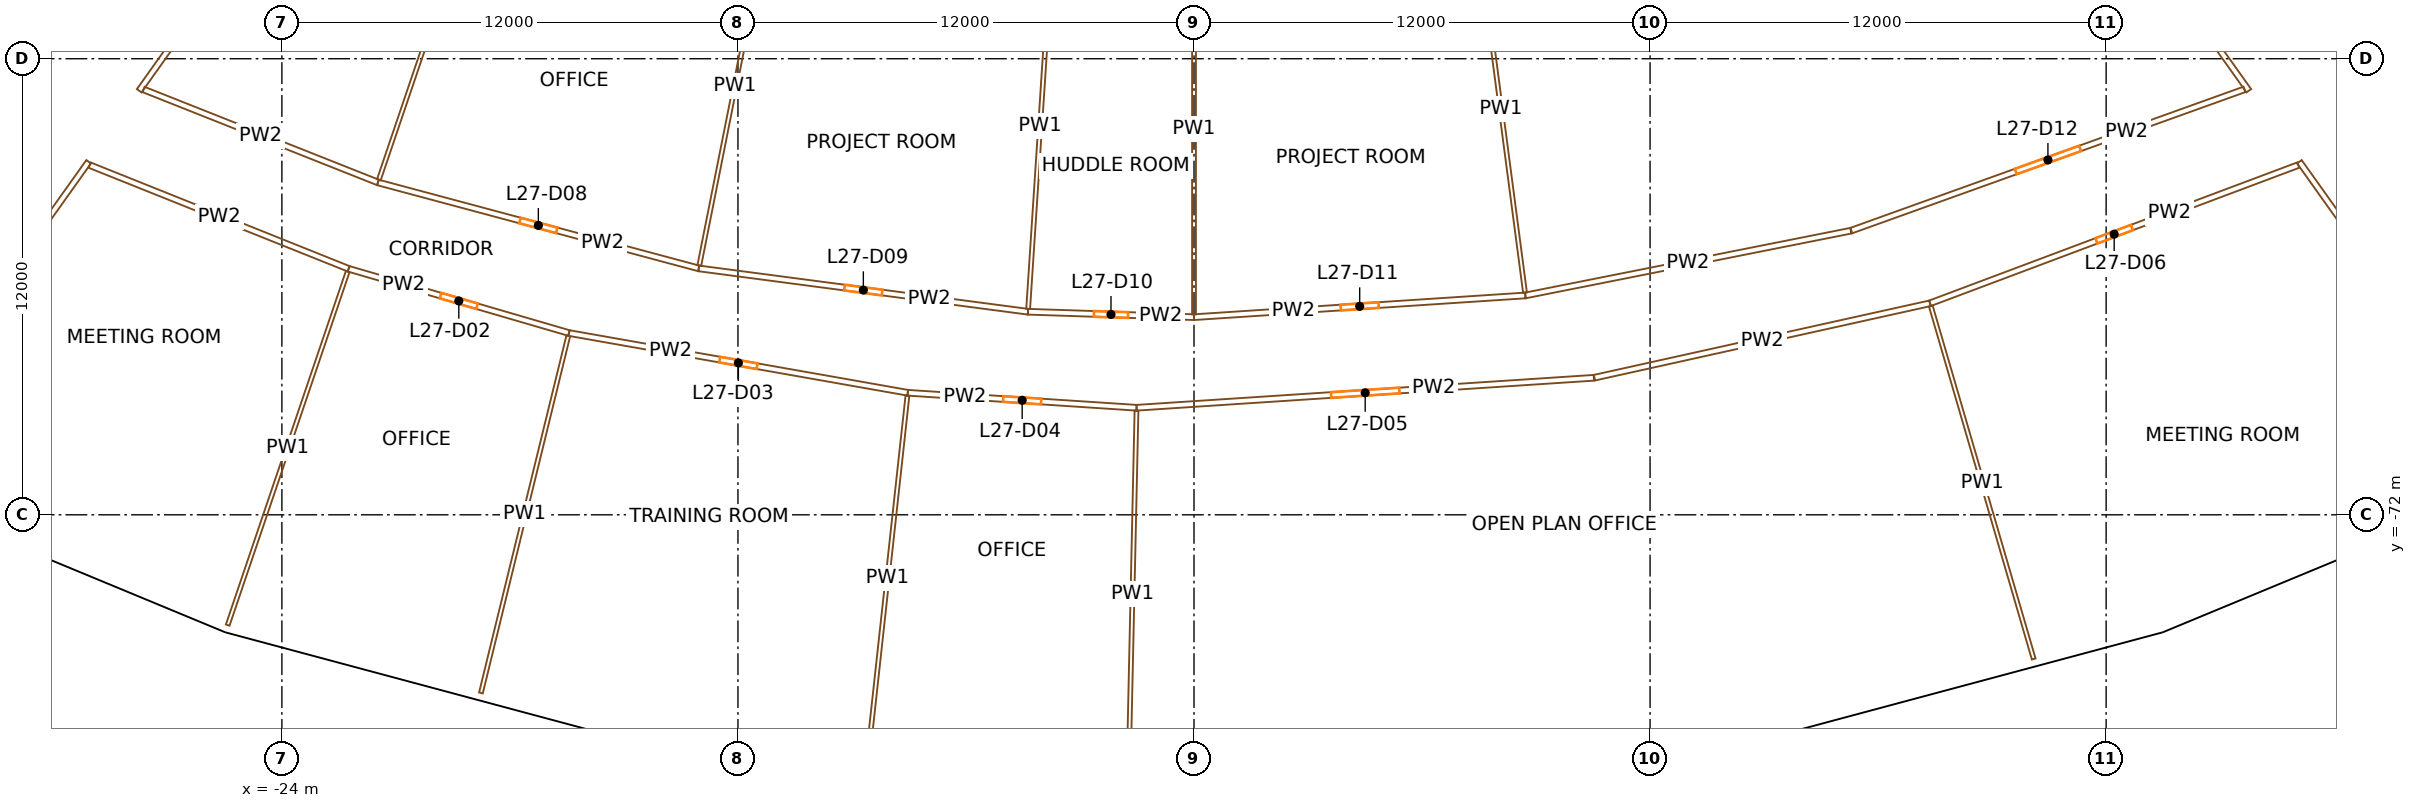
"""IFC4 building model, lengths in metres.
Left out: names, types, materials, properties, quantities, classifications, styles, units other than length and angle.
Written with IfcOpenShell. Run it as: python <this file> out.ifc"""

import sys

from ifc_helpers import new_model, si_unit, direction, frame, frame_2d, origin, origin_2d, place, context, subcontext, project, spatial, rectangle, extrude, element, fill, save


model = new_model("IFC4")
c1 = context("Model", 3, precision=1e-05, world=origin(), true_north=direction((0.0, 1.0)))
c2 = subcontext(c1, "Body", "Model", "MODEL_VIEW")
j1 = project(units=[si_unit("LENGTHUNIT", "METRE"), si_unit("PLANEANGLEUNIT", "RADIAN")], contexts=[c1])
p1 = place(None, origin())
s1 = spatial("IfcSite", under=j1, at=p1, CompositionType="ELEMENT")
p2 = place(p1, origin())
s2 = spatial("IfcBuilding", under=s1, at=p2, CompositionType="ELEMENT")
p3 = place(p2, frame((0.0, 0.0, 121.5)))
s3 = spatial("IfcBuildingStorey", under=s2, at=p3, CompositionType="ELEMENT", Elevation=121.5)
for number, where, z_axis, x_axis in (
    (1, (-24.992, -73.624, 0.0), (0.0, 0.0, 1.0), (0.947, -0.321, 0.0)),
    (2, (-15.168, -76.256, 0.0), (0.0, 0.0, 1.0), (0.981, -0.195, 0.0)),
    (3, (-5.085, -77.583, 0.0), (0.0, 0.0, 1.0), (0.998, -0.065, 0.0)),
    (4, (5.085, -77.583, 0.0), (0.0, 0.0, 1.0), (0.998, 0.065, 0.0)),
    (5, (15.168, -76.256, 0.0), (0.0, 0.0, 1.0), (0.981, 0.195, 0.0)),
    (6, (24.992, -73.624, 0.0), (0.0, 0.0, 1.0), (0.947, 0.321, 0.0)),
):
    element("IfcColumn", number, at=place(p3, frame(where, z_axis=z_axis, x_axis=x_axis)), inside=s3, PredefinedType="COLUMN", context=c2, shape_type="SweptSolid", body=[
        extrude(rectangle(XDim=1.2, YDim=1.5, at=origin_2d()), origin(), (0.0, 0.0, 1.0), 3.8),
    ])
p4 = place(p3, frame((-36.717, -66.337, 0.0), z_axis=(0.0, 0.0, 1.0), x_axis=(0.573577477574, 0.819151315216, 0.0)))
e7 = element("IfcWall", 7, at=p4, inside=s3, PredefinedType="SHEAR", context=c2, shape_type="SweptSolid", body=[
    extrude(rectangle(XDim=14.8, YDim=0.9, at=frame_2d((7.4, 0.0))), origin(), (0.0, 0.0, 1.0), 3.5),
])
p5 = place(p4, frame((6.2, 0.0, 0.0)))
e8 = element("IfcOpeningElement", 8, at=p5, cuts=e7, PredefinedType="OPENING", context=c2, shape_type="SweptSolid", body=[
    extrude(rectangle(XDim=2.4, YDim=2.1, at=frame_2d((1.2, 1.05))), frame((0.0, 0.46, 0.0), z_axis=(0.0, -1.0, 0.0), x_axis=(1.0, 0.0, 0.0)), (0.0, 0.0, 1.0), 0.92),
])
p6 = place(p3, frame((36.717, -66.337, 0.0), z_axis=(0.0, 0.0, 1.0), x_axis=(-0.573577477574, 0.819151315216, 0.0)))
e9 = element("IfcWall", 9, at=p6, inside=s3, PredefinedType="SHEAR", context=c2, shape_type="SweptSolid", body=[
    extrude(rectangle(XDim=14.8, YDim=0.9, at=frame_2d((7.4, 0.0))), origin(), (0.0, 0.0, 1.0), 3.5),
])
p7 = place(p6, frame((6.2, 0.0, 0.0)))
e10 = element("IfcOpeningElement", 10, at=p7, cuts=e9, PredefinedType="OPENING", context=c2, shape_type="SweptSolid", body=[
    extrude(rectangle(XDim=2.4, YDim=2.1, at=frame_2d((1.2, 1.05))), frame((0.0, 0.46, 0.0), z_axis=(0.0, -1.0, 0.0), x_axis=(1.0, 0.0, 0.0)), (0.0, 0.0, 1.0), 0.92),
])
p8 = place(p3, frame((-29.084, -62.71, 0.0), z_axis=(0.0, 0.0, 1.0), x_axis=(-0.580031092611, -0.814594335608, 0.0)))
e11 = element("IfcWall", 11, at=p8, inside=s3, PredefinedType="PARTITIONING", context=c2, shape_type="SweptSolid", body=[
    extrude(rectangle(XDim=10.126, YDim=0.15, at=frame_2d((5.063, 0.0))), origin(), (0.0, 0.0, 1.0), 2.4),
])
p9 = place(p8, frame((4.563, 0.0, 0.0)))
e12 = element("IfcOpeningElement", 12, at=p9, cuts=e11, PredefinedType="OPENING", context=c2, shape_type="SweptSolid", body=[
    extrude(rectangle(XDim=1.0, YDim=2.1, at=frame_2d((0.5, 1.05))), frame((0.0, 0.085, 0.0), z_axis=(0.0, -1.0, 0.0), x_axis=(1.0, 0.0, 0.0)), (0.0, 0.0, 1.0), 0.17),
])
p10 = place(p3, frame((-29.058, -62.799, 0.0), z_axis=(0.0, 0.0, 1.0), x_axis=(0.92834358791, -0.371723261025, 0.0)))
e13 = element("IfcWall", 13, at=p10, inside=s3, PredefinedType="PARTITIONING", context=c2, shape_type="SweptSolid", body=[
    extrude(rectangle(XDim=7.34, YDim=0.15, at=frame_2d((3.67, 0.0))), origin(), (0.0, 0.0, 1.0), 2.4),
])
p11 = place(p3, frame((-27.641, -60.809, 0.0), z_axis=(0.0, 0.0, 1.0), x_axis=(0.929586380114, -0.368604343308, 0.0)))
e14 = element("IfcWall", 14, at=p11, inside=s3, PredefinedType="PARTITIONING", context=c2, shape_type="SweptSolid", body=[
    extrude(rectangle(XDim=6.636, YDim=0.15, at=frame_2d((3.318, 0.0))), origin(), (0.0, 0.0, 1.0), 2.4),
])
p12 = place(p3, frame((-25.426, -74.902, 0.0), z_axis=(0.0, 0.0, 1.0), x_axis=(0.3214264651, 0.94693454237, 0.0)))
e15 = element("IfcWall", 15, at=p12, inside=s3, PredefinedType="PARTITIONING", context=c2, shape_type="SweptSolid", body=[
    extrude(rectangle(XDim=9.825, YDim=0.1, at=frame_2d((4.912, 0.0))), origin(), (0.0, 0.0, 1.0), 2.4),
])
p13 = place(p3, frame((-16.446, -67.217, 0.0), z_axis=(0.0, 0.0, 1.0), x_axis=(-0.960056580345, 0.279805937279, 0.0)))
e16 = element("IfcWall", 16, at=p13, inside=s3, PredefinedType="PARTITIONING", context=c2, shape_type="SweptSolid", body=[
    extrude(rectangle(XDim=6.039, YDim=0.15, at=frame_2d((3.02, 0.0))), origin(), (0.0, 0.0, 1.0), 2.4),
])
p14 = place(p13, frame((2.52, 0.0, 0.0)))
e17 = element("IfcOpeningElement", 17, at=p14, cuts=e16, PredefinedType="OPENING", context=c2, shape_type="SweptSolid", body=[
    extrude(rectangle(XDim=1.0, YDim=2.1, at=frame_2d((0.5, 1.05))), frame((0.0, 0.085, 0.0), z_axis=(0.0, -1.0, 0.0), x_axis=(1.0, 0.0, 0.0)), (0.0, 0.0, 1.0), 0.17),
])
p15 = place(p3, frame((-21.884, -52.598, 0.0), z_axis=(0.0, 0.0, 1.0), x_axis=(-0.580016763963, -0.814604538118, 0.0)))
e18 = element("IfcWall", 18, at=p15, inside=s3, PredefinedType="PARTITIONING", context=c2, shape_type="SweptSolid", body=[
    extrude(rectangle(XDim=10.121, YDim=0.15, at=frame_2d((5.061, 0.0))), origin(), (0.0, 0.0, 1.0), 2.4),
])
p16 = place(p15, frame((4.561, 0.0, 0.0)))
e19 = element("IfcOpeningElement", 19, at=p16, cuts=e18, PredefinedType="OPENING", context=c2, shape_type="SweptSolid", body=[
    extrude(rectangle(XDim=1.0, YDim=2.1, at=frame_2d((0.5, 1.05))), frame((0.0, 0.085, 0.0), z_axis=(0.0, -1.0, 0.0), x_axis=(1.0, 0.0, 0.0)), (0.0, 0.0, 1.0), 0.17),
])
p17 = place(p3, frame((-21.472, -63.255, 0.0), z_axis=(0.0, 0.0, 1.0), x_axis=(0.965927722938, -0.258811966607, 0.0)))
e20 = element("IfcWall", 20, at=p17, inside=s3, PredefinedType="PARTITIONING", context=c2, shape_type="SweptSolid", body=[
    extrude(rectangle(XDim=8.738, YDim=0.15, at=frame_2d((4.369, 0.0))), origin(), (0.0, 0.0, 1.0), 2.4),
])
p18 = place(p17, frame((3.869, 0.0, 0.0)))
e21 = element("IfcOpeningElement", 21, at=p18, cuts=e20, PredefinedType="OPENING", context=c2, shape_type="SweptSolid", body=[
    extrude(rectangle(XDim=1.0, YDim=2.1, at=frame_2d((0.5, 1.05))), frame((0.0, 0.085, 0.0), z_axis=(0.0, -1.0, 0.0), x_axis=(1.0, 0.0, 0.0)), (0.0, 0.0, 1.0), 0.17),
])
p19 = place(p3, frame((-18.763, -76.687, 0.0), z_axis=(0.0, 0.0, 1.0), x_axis=(0.237657357205, 0.971349051869, 0.0)))
e22 = element("IfcWall", 22, at=p19, inside=s3, PredefinedType="PARTITIONING", context=c2, shape_type="SweptSolid", body=[
    extrude(rectangle(XDim=9.674, YDim=0.1, at=frame_2d((4.837, 0.0))), origin(), (0.0, 0.0, 1.0), 2.4),
])
p20 = place(p3, frame((-18.354, -54.07, 0.0), z_axis=(0.0, 0.0, 1.0), x_axis=(-0.321435668314, -0.946931418391, 0.0)))
e23 = element("IfcWall", 23, at=p20, inside=s3, PredefinedType="PARTITIONING", context=c2, shape_type="SweptSolid", body=[
    extrude(rectangle(XDim=9.625, YDim=0.1, at=frame_2d((4.812, 0.0))), origin(), (0.0, 0.0, 1.0), 2.4),
])
p21 = place(p3, frame((-7.532, -68.789, 0.0), z_axis=(0.0, 0.0, 1.0), x_axis=(-0.984813412134, 0.173616080133, 0.0)))
e24 = element("IfcWall", 24, at=p21, inside=s3, PredefinedType="PARTITIONING", context=c2, shape_type="SweptSolid", body=[
    extrude(rectangle(XDim=9.052, YDim=0.15, at=frame_2d((4.526, 0.0))), origin(), (0.0, 0.0, 1.0), 2.4),
])
p22 = place(p21, frame((4.026, 0.0, 0.0)))
e25 = element("IfcOpeningElement", 25, at=p22, cuts=e24, PredefinedType="OPENING", context=c2, shape_type="SweptSolid", body=[
    extrude(rectangle(XDim=1.0, YDim=2.1, at=frame_2d((0.5, 1.05))), frame((0.0, 0.085, 0.0), z_axis=(0.0, -1.0, 0.0), x_axis=(1.0, 0.0, 0.0)), (0.0, 0.0, 1.0), 0.17),
])
p23 = place(p3, frame((-13.032, -65.516, 0.0), z_axis=(0.0, 0.0, 1.0), x_axis=(0.991443260322, -0.130538352841, 0.0)))
e26 = element("IfcWall", 26, at=p23, inside=s3, PredefinedType="PARTITIONING", context=c2, shape_type="SweptSolid", body=[
    extrude(rectangle(XDim=8.738, YDim=0.15, at=frame_2d((4.369, 0.0))), origin(), (0.0, 0.0, 1.0), 2.4),
])
p24 = place(p23, frame((3.869, 0.0, 0.0)))
e27 = element("IfcOpeningElement", 27, at=p24, cuts=e26, PredefinedType="OPENING", context=c2, shape_type="SweptSolid", body=[
    extrude(rectangle(XDim=1.0, YDim=2.1, at=frame_2d((0.5, 1.05))), frame((0.0, 0.085, 0.0), z_axis=(0.0, -1.0, 0.0), x_axis=(1.0, 0.0, 0.0)), (0.0, 0.0, 1.0), 0.17),
])
p25 = place(p3, frame((-11.14, -56.003, 0.0), z_axis=(0.0, 0.0, 1.0), x_axis=(-0.195086769421, -0.980785987052, 0.0)))
e28 = element("IfcWall", 28, at=p25, inside=s3, PredefinedType="PARTITIONING", context=c2, shape_type="SweptSolid", body=[
    extrude(rectangle(XDim=9.625, YDim=0.1, at=frame_2d((4.812, 0.0))), origin(), (0.0, 0.0, 1.0), 2.4),
])
p26 = place(p3, frame((-8.593, -78.48, 0.0), z_axis=(0.0, 0.0, 1.0), x_axis=(0.10884699726, 0.994058514972, 0.0)))
e29 = element("IfcWall", 29, at=p26, inside=s3, PredefinedType="PARTITIONING", context=c2, shape_type="SweptSolid", body=[
    extrude(rectangle(XDim=9.674, YDim=0.1, at=frame_2d((4.837, 0.0))), origin(), (0.0, 0.0, 1.0), 2.4),
])
p27 = place(p3, frame((-1.511, -69.184, 0.0), z_axis=(0.0, 0.0, 1.0), x_axis=(-0.997856905736, 0.065433903101, 0.0)))
e30 = element("IfcWall", 30, at=p27, inside=s3, PredefinedType="PARTITIONING", context=c2, shape_type="SweptSolid", body=[
    extrude(rectangle(XDim=6.033, YDim=0.15, at=frame_2d((3.017, 0.0))), origin(), (0.0, 0.0, 1.0), 2.4),
])
p28 = place(p27, frame((2.517, 0.0, 0.0)))
e31 = element("IfcOpeningElement", 31, at=p28, cuts=e30, PredefinedType="OPENING", context=c2, shape_type="SweptSolid", body=[
    extrude(rectangle(XDim=1.0, YDim=2.1, at=frame_2d((0.5, 1.05))), frame((0.0, 0.085, 0.0), z_axis=(0.0, -1.0, 0.0), x_axis=(1.0, 0.0, 0.0)), (0.0, 0.0, 1.0), 0.17),
])
p29 = place(p3, frame((-4.369, -66.657, 0.0), z_axis=(0.0, 0.0, 1.0), x_axis=(0.99946426167, -0.03272903366, 0.0)))
e32 = element("IfcWall", 32, at=p29, inside=s3, PredefinedType="PARTITIONING", context=c2, shape_type="SweptSolid", body=[
    extrude(rectangle(XDim=4.371, YDim=0.15, at=frame_2d((2.186, 0.0))), origin(), (0.0, 0.0, 1.0), 2.4),
])
p30 = place(p29, frame((1.736, 0.0, 0.0)))
e33 = element("IfcOpeningElement", 33, at=p30, cuts=e32, PredefinedType="OPENING", context=c2, shape_type="SweptSolid", body=[
    extrude(rectangle(XDim=0.9, YDim=2.1, at=frame_2d((0.45, 1.05))), frame((0.0, 0.085, 0.0), z_axis=(0.0, -1.0, 0.0), x_axis=(1.0, 0.0, 0.0)), (0.0, 0.0, 1.0), 0.17),
])
p31 = place(p3, frame((-3.735, -56.978, 0.0), z_axis=(0.0, 0.0, 1.0), x_axis=(-0.065392665599, -0.997859609006, 0.0)))
e34 = element("IfcWall", 34, at=p31, inside=s3, PredefinedType="PARTITIONING", context=c2, shape_type="SweptSolid", body=[
    extrude(rectangle(XDim=9.625, YDim=0.1, at=frame_2d((4.812, 0.0))), origin(), (0.0, 0.0, 1.0), 2.4),
])
p32 = place(p3, frame((-1.724, -78.93, 0.0), z_axis=(0.0, 0.0, 1.0), x_axis=(0.021829960086, 0.999761698027, 0.0)))
e35 = element("IfcWall", 35, at=p32, inside=s3, PredefinedType="PARTITIONING", context=c2, shape_type="SweptSolid", body=[
    extrude(rectangle(XDim=9.674, YDim=0.1, at=frame_2d((4.837, 0.0))), origin(), (0.0, 0.0, 1.0), 2.4),
])
p33 = place(p3, frame((10.52, -68.395, 0.0), z_axis=(0.0, 0.0, 1.0), x_axis=(-0.997857664211, -0.065422335445, 0.0)))
e36 = element("IfcWall", 36, at=p33, inside=s3, PredefinedType="PARTITIONING", context=c2, shape_type="SweptSolid", body=[
    extrude(rectangle(XDim=12.057, YDim=0.15, at=frame_2d((6.029, 0.0))), origin(), (0.0, 0.0, 1.0), 2.4),
])
p34 = place(p33, frame((5.129, 0.0, 0.0)))
e37 = element("IfcOpeningElement", 37, at=p34, cuts=e36, PredefinedType="OPENING", context=c2, shape_type="SweptSolid", body=[
    extrude(rectangle(XDim=1.8, YDim=2.1, at=frame_2d((0.9, 1.05))), frame((0.0, 0.085, 0.0), z_axis=(0.0, -1.0, 0.0), x_axis=(1.0, 0.0, 0.0)), (0.0, 0.0, 1.0), 0.17),
])
p35 = place(p3, frame((0.0, -66.8, 0.0), z_axis=(0.0, 0.0, 1.0), x_axis=(0.997858593599, 0.065408158359, 0.0)))
e38 = element("IfcWall", 38, at=p35, inside=s3, PredefinedType="PARTITIONING", context=c2, shape_type="SweptSolid", body=[
    extrude(rectangle(XDim=8.738, YDim=0.15, at=frame_2d((4.369, 0.0))), origin(), (0.0, 0.0, 1.0), 2.4),
])
p36 = place(p35, frame((3.869, 0.0, 0.0)))
e39 = element("IfcOpeningElement", 39, at=p36, cuts=e38, PredefinedType="OPENING", context=c2, shape_type="SweptSolid", body=[
    extrude(rectangle(XDim=1.0, YDim=2.1, at=frame_2d((0.5, 1.05))), frame((0.0, 0.085, 0.0), z_axis=(0.0, -1.0, 0.0), x_axis=(1.0, 0.0, 0.0)), (0.0, 0.0, 1.0), 0.17),
])
p37 = place(p3, frame((0.0, -56.979, 0.0), z_axis=(0.0, 0.0, 1.0), x_axis=(0.0, -1.0, 0.0)))
e40 = element("IfcWall", 40, at=p37, inside=s3, PredefinedType="PARTITIONING", context=c2, shape_type="SweptSolid", body=[
    extrude(rectangle(XDim=9.747, YDim=0.1, at=frame_2d((4.873, 0.0))), origin(), (0.0, 0.0, 1.0), 2.4),
])
p38 = place(p3, frame((7.437, -56.491, 0.0), z_axis=(0.0, 0.0, 1.0), x_axis=(0.13053421433, -0.99144380521, 0.0)))
e41 = element("IfcWall", 41, at=p38, inside=s3, PredefinedType="PARTITIONING", context=c2, shape_type="SweptSolid", body=[
    extrude(rectangle(XDim=9.746, YDim=0.1, at=frame_2d((4.873, 0.0))), origin(), (0.0, 0.0, 1.0), 2.4),
])
p39 = place(p3, frame((8.719, -66.229, 0.0), z_axis=(0.0, 0.0, 1.0), x_axis=(0.980787736115, 0.195077975915, 0.0)))
e42 = element("IfcWall", 42, at=p39, inside=s3, PredefinedType="PARTITIONING", context=c2, shape_type="SweptSolid", body=[
    extrude(rectangle(XDim=8.729, YDim=0.15, at=frame_2d((4.365, 0.0))), origin(), (0.0, 0.0, 1.0), 2.4),
])
p40 = place(p3, frame((10.537, -68.392, 0.0), z_axis=(0.0, 0.0, 1.0), x_axis=(0.97628985912, 0.216467343909, 0.0)))
e43 = element("IfcWall", 43, at=p40, inside=s3, PredefinedType="PARTITIONING", context=c2, shape_type="SweptSolid", body=[
    extrude(rectangle(XDim=9.043, YDim=0.15, at=frame_2d((4.521, 0.0))), origin(), (0.0, 0.0, 1.0), 2.4),
])
p41 = place(p3, frame((17.297, -64.521, 0.0), z_axis=(0.0, 0.0, 1.0), x_axis=(0.941151914592, 0.337983836389, 0.0)))
e44 = element("IfcWall", 44, at=p41, inside=s3, PredefinedType="PARTITIONING", context=c2, shape_type="SweptSolid", body=[
    extrude(rectangle(XDim=10.99, YDim=0.15, at=frame_2d((5.495, 0.0))), origin(), (0.0, 0.0, 1.0), 2.4),
])
p42 = place(p41, frame((4.595, 0.0, 0.0)))
e45 = element("IfcOpeningElement", 45, at=p42, cuts=e44, PredefinedType="OPENING", context=c2, shape_type="SweptSolid", body=[
    extrude(rectangle(XDim=1.8, YDim=2.1, at=frame_2d((0.9, 1.05))), frame((0.0, 0.085, 0.0), z_axis=(0.0, -1.0, 0.0), x_axis=(1.0, 0.0, 0.0)), (0.0, 0.0, 1.0), 0.17),
])
p43 = place(p3, frame((29.057, -62.798, 0.0), z_axis=(0.0, 0.0, 1.0), x_axis=(-0.936236096431, -0.351371557956, 0.0)))
e46 = element("IfcWall", 46, at=p43, inside=s3, PredefinedType="PARTITIONING", context=c2, shape_type="SweptSolid", body=[
    extrude(rectangle(XDim=10.352, YDim=0.15, at=frame_2d((5.176, 0.0))), origin(), (0.0, 0.0, 1.0), 2.4),
])
p44 = place(p43, frame((4.676, 0.0, 0.0)))
e47 = element("IfcOpeningElement", 47, at=p44, cuts=e46, PredefinedType="OPENING", context=c2, shape_type="SweptSolid", body=[
    extrude(rectangle(XDim=1.0, YDim=2.1, at=frame_2d((0.5, 1.05))), frame((0.0, 0.085, 0.0), z_axis=(0.0, -1.0, 0.0), x_axis=(1.0, 0.0, 0.0)), (0.0, 0.0, 1.0), 0.17),
])
p45 = place(p3, frame((21.884, -52.598, 0.0), z_axis=(0.0, 0.0, 1.0), x_axis=(0.580016763963, -0.814604538118, 0.0)))
e48 = element("IfcWall", 48, at=p45, inside=s3, PredefinedType="PARTITIONING", context=c2, shape_type="SweptSolid", body=[
    extrude(rectangle(XDim=10.121, YDim=0.15, at=frame_2d((5.061, 0.0))), origin(), (0.0, 0.0, 1.0), 2.4),
])
p46 = place(p3, frame((22.094, -75.794, 0.0), z_axis=(0.0, 0.0, 1.0), x_axis=(-0.279846881911, 0.960044646194, 0.0)))
e49 = element("IfcWall", 49, at=p46, inside=s3, PredefinedType="PARTITIONING", context=c2, shape_type="SweptSolid", body=[
    extrude(rectangle(XDim=9.674, YDim=0.1, at=frame_2d((4.837, 0.0))), origin(), (0.0, 0.0, 1.0), 2.4),
])
p47 = place(p3, frame((29.084, -62.71, 0.0), z_axis=(0.0, 0.0, 1.0), x_axis=(0.580031092611, -0.814594335608, 0.0)))
e50 = element("IfcWall", 50, at=p47, inside=s3, PredefinedType="PARTITIONING", context=c2, shape_type="SweptSolid", body=[
    extrude(rectangle(XDim=10.126, YDim=0.15, at=frame_2d((5.063, 0.0))), origin(), (0.0, 0.0, 1.0), 2.4),
])
p48 = place(p14, origin())
e51 = element("IfcDoor", 51, at=p48, inside=s3, OperationType="SINGLE_SWING_RIGHT", PredefinedType="DOOR", context=c2, shape_type="SweptSolid", body=[
    extrude(rectangle(XDim=1.0, YDim=2.1, at=frame_2d((0.5, 1.05))), frame((0.0, 0.025, 0.0), z_axis=(0.0, -1.0, 0.0), x_axis=(1.0, 0.0, 0.0)), (0.0, 0.0, 1.0), 0.05),
])
fill(e17, e51)
p49 = place(p22, origin())
e52 = element("IfcDoor", 52, at=p49, inside=s3, OperationType="SINGLE_SWING_RIGHT", PredefinedType="DOOR", context=c2, shape_type="SweptSolid", body=[
    extrude(rectangle(XDim=1.0, YDim=2.1, at=frame_2d((0.5, 1.05))), frame((0.0, 0.025, 0.0), z_axis=(0.0, -1.0, 0.0), x_axis=(1.0, 0.0, 0.0)), (0.0, 0.0, 1.0), 0.05),
])
fill(e25, e52)
p50 = place(p28, origin())
e53 = element("IfcDoor", 53, at=p50, inside=s3, OperationType="SINGLE_SWING_RIGHT", PredefinedType="DOOR", context=c2, shape_type="SweptSolid", body=[
    extrude(rectangle(XDim=1.0, YDim=2.1, at=frame_2d((0.5, 1.05))), frame((0.0, 0.025, 0.0), z_axis=(0.0, -1.0, 0.0), x_axis=(1.0, 0.0, 0.0)), (0.0, 0.0, 1.0), 0.05),
])
fill(e31, e53)
p51 = place(p34, origin())
e54 = element("IfcDoor", 54, at=p51, inside=s3, OperationType="DOUBLE_DOOR_SINGLE_SWING", PredefinedType="DOOR", context=c2, shape_type="SweptSolid", body=[
    extrude(rectangle(XDim=1.8, YDim=2.1, at=frame_2d((0.9, 1.05))), frame((0.0, 0.025, 0.0), z_axis=(0.0, -1.0, 0.0), x_axis=(1.0, 0.0, 0.0)), (0.0, 0.0, 1.0), 0.05),
])
fill(e37, e54)
p52 = place(p44, origin())
e55 = element("IfcDoor", 55, at=p52, inside=s3, OperationType="SINGLE_SWING_RIGHT", PredefinedType="DOOR", context=c2, shape_type="SweptSolid", body=[
    extrude(rectangle(XDim=1.0, YDim=2.1, at=frame_2d((0.5, 1.05))), frame((0.0, 0.025, 0.0), z_axis=(0.0, -1.0, 0.0), x_axis=(1.0, 0.0, 0.0)), (0.0, 0.0, 1.0), 0.05),
])
fill(e47, e55)
p53 = place(p18, origin())
e56 = element("IfcDoor", 56, at=p53, inside=s3, OperationType="SINGLE_SWING_RIGHT", PredefinedType="DOOR", context=c2, shape_type="SweptSolid", body=[
    extrude(rectangle(XDim=1.0, YDim=2.1, at=frame_2d((0.5, 1.05))), frame((0.0, 0.025, 0.0), z_axis=(0.0, -1.0, 0.0), x_axis=(1.0, 0.0, 0.0)), (0.0, 0.0, 1.0), 0.05),
])
fill(e21, e56)
p54 = place(p24, origin())
e57 = element("IfcDoor", 57, at=p54, inside=s3, OperationType="SINGLE_SWING_RIGHT", PredefinedType="DOOR", context=c2, shape_type="SweptSolid", body=[
    extrude(rectangle(XDim=1.0, YDim=2.1, at=frame_2d((0.5, 1.05))), frame((0.0, 0.025, 0.0), z_axis=(0.0, -1.0, 0.0), x_axis=(1.0, 0.0, 0.0)), (0.0, 0.0, 1.0), 0.05),
])
fill(e27, e57)
p55 = place(p30, origin())
e58 = element("IfcDoor", 58, at=p55, inside=s3, OperationType="SINGLE_SWING_RIGHT", PredefinedType="DOOR", context=c2, shape_type="SweptSolid", body=[
    extrude(rectangle(XDim=0.9, YDim=2.1, at=frame_2d((0.45, 1.05))), frame((0.0, 0.025, 0.0), z_axis=(0.0, -1.0, 0.0), x_axis=(1.0, 0.0, 0.0)), (0.0, 0.0, 1.0), 0.05),
])
fill(e33, e58)
p56 = place(p36, origin())
e59 = element("IfcDoor", 59, at=p56, inside=s3, OperationType="SINGLE_SWING_RIGHT", PredefinedType="DOOR", context=c2, shape_type="SweptSolid", body=[
    extrude(rectangle(XDim=1.0, YDim=2.1, at=frame_2d((0.5, 1.05))), frame((0.0, 0.025, 0.0), z_axis=(0.0, -1.0, 0.0), x_axis=(1.0, 0.0, 0.0)), (0.0, 0.0, 1.0), 0.05),
])
fill(e39, e59)
p57 = place(p42, origin())
e60 = element("IfcDoor", 60, at=p57, inside=s3, OperationType="DOUBLE_DOOR_SINGLE_SWING", PredefinedType="DOOR", context=c2, shape_type="SweptSolid", body=[
    extrude(rectangle(XDim=1.8, YDim=2.1, at=frame_2d((0.9, 1.05))), frame((0.0, 0.025, 0.0), z_axis=(0.0, -1.0, 0.0), x_axis=(1.0, 0.0, 0.0)), (0.0, 0.0, 1.0), 0.05),
])
fill(e45, e60)
save(model, sys.argv[1])
